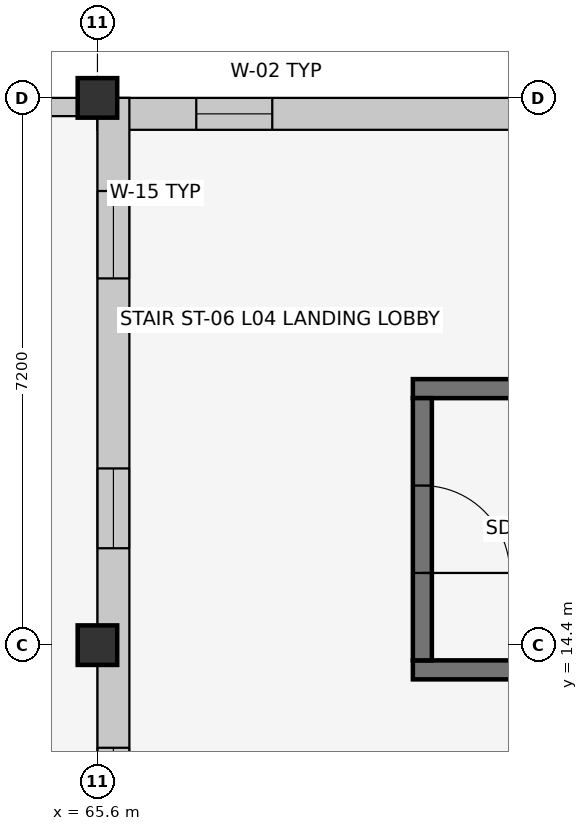
"""IFC4 building model, lengths in metres.
Left out: names, types, materials, properties, quantities, classifications, styles, units other than length and angle.
Written with IfcOpenShell. Run it as: python <this file> out.ifc"""

import sys

from ifc_helpers import new_model, si_unit, direction, frame, frame_2d, origin, origin_2d, place, context, subcontext, project, spatial, rectangle, extrude, element, fill, save


model = new_model("IFC4")
c1 = context("Model", 3, precision=1e-05, world=origin(), true_north=direction((0.0, 1.0)))
c2 = subcontext(c1, "Body", "Model", "MODEL_VIEW")
j1 = project(units=[si_unit("LENGTHUNIT", "METRE"), si_unit("PLANEANGLEUNIT", "RADIAN")], contexts=[c1])
p1 = place(None, origin())
s1 = spatial("IfcSite", under=j1, at=p1, CompositionType="ELEMENT")
p2 = place(p1, origin())
s2 = spatial("IfcBuilding", under=s1, at=p2, CompositionType="ELEMENT")
p3 = place(p2, frame((0.0, 0.0, 18.0)))
s3 = spatial("IfcBuildingStorey", under=s2, at=p3, CompositionType="ELEMENT", Elevation=18.0)
for number, where, z_axis, x_axis in (
    (1, (65.6, 14.4, 0.0), (0.0, 0.0, 1.0), (1.0, 0.0, 0.0)),
    (2, (65.6, 21.6, 0.0), (0.0, 0.0, 1.0), (1.0, 0.0, 0.0)),
):
    element("IfcColumn", number, at=place(p3, frame(where, z_axis=z_axis, x_axis=x_axis)), inside=s3, PredefinedType="COLUMN", context=c2, shape_type="SweptSolid", body=[
        extrude(rectangle(XDim=0.52, YDim=0.52, at=origin_2d()), origin(), (0.0, 0.0, 1.0), 3.9),
    ])
p4 = place(p3, frame((65.6, 21.39, 0.0), z_axis=(0.0, 0.0, 1.0), x_axis=(1.0, 0.0, 0.0)))
e3 = element("IfcWall", 3, at=p4, inside=s3, PredefinedType="SOLIDWALL", context=c2, shape_type="SweptSolid", body=[
    extrude(rectangle(XDim=28.8, YDim=0.42, at=frame_2d((14.4, 0.0))), origin(), (0.0, 0.0, 1.0), 2.955),
])
p5 = place(p4, frame((1.3, 0.0, 0.9)))
e4 = element("IfcOpeningElement", 4, at=p5, cuts=e3, PredefinedType="OPENING", context=c2, shape_type="SweptSolid", body=[
    extrude(rectangle(XDim=1.0, YDim=1.35, at=frame_2d((0.5, 0.675))), frame((0.0, 0.222, 0.0), z_axis=(0.0, -1.0, 0.0), x_axis=(1.0, 0.0, 0.0)), (0.0, 0.0, 1.0), 0.444),
])
p6 = place(p4, frame((8.4, 0.0, 0.9)))
e5 = element("IfcOpeningElement", 5, at=p6, cuts=e3, PredefinedType="OPENING", context=c2, shape_type="SweptSolid", body=[
    extrude(rectangle(XDim=1.2, YDim=1.35, at=frame_2d((0.6, 0.675))), frame((0.0, 0.222, 0.0), z_axis=(0.0, -1.0, 0.0), x_axis=(1.0, 0.0, 0.0)), (0.0, 0.0, 1.0), 0.444),
])
p7 = place(p4, frame((11.95, 0.0, 0.9)))
e6 = element("IfcOpeningElement", 6, at=p7, cuts=e3, PredefinedType="OPENING", context=c2, shape_type="SweptSolid", body=[
    extrude(rectangle(XDim=1.3, YDim=1.35, at=frame_2d((0.65, 0.675))), frame((0.0, 0.222, 0.0), z_axis=(0.0, -1.0, 0.0), x_axis=(1.0, 0.0, 0.0)), (0.0, 0.0, 1.0), 0.444),
])
p8 = place(p4, frame((15.5, 0.0, 0.9)))
e7 = element("IfcOpeningElement", 7, at=p8, cuts=e3, PredefinedType="OPENING", context=c2, shape_type="SweptSolid", body=[
    extrude(rectangle(XDim=1.4, YDim=1.35, at=frame_2d((0.7, 0.675))), frame((0.0, 0.222, 0.0), z_axis=(0.0, -1.0, 0.0), x_axis=(1.0, 0.0, 0.0)), (0.0, 0.0, 1.0), 0.444),
])
p9 = place(p4, frame((22.875, 0.0, 0.9)))
e8 = element("IfcOpeningElement", 8, at=p9, cuts=e3, PredefinedType="OPENING", context=c2, shape_type="SweptSolid", body=[
    extrude(rectangle(XDim=1.05, YDim=1.45, at=frame_2d((0.525, 0.725))), frame((0.0, 0.222, 0.0), z_axis=(0.0, -1.0, 0.0), x_axis=(1.0, 0.0, 0.0)), (0.0, 0.0, 1.0), 0.444),
])
p10 = place(p4, frame((26.425, 0.0, 0.9)))
e9 = element("IfcOpeningElement", 9, at=p10, cuts=e3, PredefinedType="OPENING", context=c2, shape_type="SweptSolid", body=[
    extrude(rectangle(XDim=1.15, YDim=1.45, at=frame_2d((0.575, 0.725))), frame((0.0, 0.222, 0.0), z_axis=(0.0, -1.0, 0.0), x_axis=(1.0, 0.0, 0.0)), (0.0, 0.0, 1.0), 0.444),
])
p11 = place(p3, frame((65.81, 0.0, 0.0), z_axis=(0.0, 0.0, 1.0), x_axis=(0.0, 1.0, 0.0)))
e10 = element("IfcWall", 10, at=p11, inside=s3, PredefinedType="SOLIDWALL", context=c2, shape_type="SweptSolid", body=[
    extrude(rectangle(XDim=21.6, YDim=0.42, at=frame_2d((10.8, 0.0))), origin(), (0.0, 0.0, 1.0), 3.055),
])
p12 = place(p11, frame((1.175, 0.0, 0.9)))
e11 = element("IfcOpeningElement", 11, at=p12, cuts=e10, PredefinedType="OPENING", context=c2, shape_type="SweptSolid", body=[
    extrude(rectangle(XDim=1.25, YDim=1.45, at=frame_2d((0.625, 0.725))), frame((0.0, 0.222, 0.0), z_axis=(0.0, -1.0, 0.0), x_axis=(1.0, 0.0, 0.0)), (0.0, 0.0, 1.0), 0.444),
])
p13 = place(p11, frame((4.725, 0.0, 0.9)))
e12 = element("IfcOpeningElement", 12, at=p13, cuts=e10, PredefinedType="OPENING", context=c2, shape_type="SweptSolid", body=[
    extrude(rectangle(XDim=1.35, YDim=1.45, at=frame_2d((0.675, 0.725))), frame((0.0, 0.222, 0.0), z_axis=(0.0, -1.0, 0.0), x_axis=(1.0, 0.0, 0.0)), (0.0, 0.0, 1.0), 0.444),
])
p14 = place(p11, frame((8.275, 0.0, 0.9)))
e13 = element("IfcOpeningElement", 13, at=p14, cuts=e10, PredefinedType="OPENING", context=c2, shape_type="SweptSolid", body=[
    extrude(rectangle(XDim=1.45, YDim=1.45, at=frame_2d((0.725, 0.725))), frame((0.0, 0.222, 0.0), z_axis=(0.0, -1.0, 0.0), x_axis=(1.0, 0.0, 0.0)), (0.0, 0.0, 1.0), 0.444),
])
p15 = place(p11, frame((12.15, 0.0, 0.9)))
e14 = element("IfcOpeningElement", 14, at=p15, cuts=e10, PredefinedType="OPENING", context=c2, shape_type="SweptSolid", body=[
    extrude(rectangle(XDim=0.9, YDim=1.6, at=frame_2d((0.45, 0.8))), frame((0.0, 0.222, 0.0), z_axis=(0.0, -1.0, 0.0), x_axis=(1.0, 0.0, 0.0)), (0.0, 0.0, 1.0), 0.444),
])
p16 = place(p11, frame((15.675, 0.0, 0.9)))
e15 = element("IfcOpeningElement", 15, at=p16, cuts=e10, PredefinedType="OPENING", context=c2, shape_type="SweptSolid", body=[
    extrude(rectangle(XDim=1.05, YDim=1.6, at=frame_2d((0.525, 0.8))), frame((0.0, 0.222, 0.0), z_axis=(0.0, -1.0, 0.0), x_axis=(1.0, 0.0, 0.0)), (0.0, 0.0, 1.0), 0.444),
])
p17 = place(p11, frame((19.225, 0.0, 0.9)))
e16 = element("IfcOpeningElement", 16, at=p17, cuts=e10, PredefinedType="OPENING", context=c2, shape_type="SweptSolid", body=[
    extrude(rectangle(XDim=1.15, YDim=1.6, at=frame_2d((0.575, 0.8))), frame((0.0, 0.222, 0.0), z_axis=(0.0, -1.0, 0.0), x_axis=(1.0, 0.0, 0.0)), (0.0, 0.0, 1.0), 0.444),
])
p18 = place(p3, frame((58.55, 21.48, 0.0), z_axis=(0.0, 0.0, 1.0), x_axis=(1.0, 0.0, 0.0)))
e17 = element("IfcWall", 17, at=p18, inside=s3, PredefinedType="PARAPET", context=c2, shape_type="SweptSolid", body=[
    extrude(rectangle(XDim=6.9, YDim=0.24, at=frame_2d((3.45, 0.0))), origin(), (0.0, 0.0, 1.0), 0.65),
])
for number, where, z_axis, x_axis in (
    (18, (69.75, 14.075, 0.0), (0.0, 0.0, 1.0), (1.0, 0.0, 0.0)),
    (19, (78.65, 17.775, 0.0), (0.0, 0.0, 1.0), (-1.0, 0.0, 0.0)),
):
    element("IfcWall", number, at=place(p3, frame(where, z_axis=z_axis, x_axis=x_axis)), inside=s3, PredefinedType="SHEAR", context=c2, shape_type="SweptSolid", body=[
        extrude(rectangle(XDim=8.9, YDim=0.25, at=frame_2d((4.45, 0.0))), origin(), (0.0, 0.0, 1.0), 3.66),
    ])
p19 = place(p3, frame((69.875, 17.65, 0.0), z_axis=(0.0, 0.0, 1.0), x_axis=(0.0, -1.0, 0.0)))
e20 = element("IfcWall", 20, at=p19, inside=s3, PredefinedType="SHEAR", context=c2, shape_type="SweptSolid", body=[
    extrude(rectangle(XDim=3.45, YDim=0.25, at=frame_2d((1.725, 0.0))), origin(), (0.0, 0.0, 1.0), 3.66),
])
p20 = place(p19, frame((1.15, 0.0, 0.0)))
e21 = element("IfcOpeningElement", 21, at=p20, cuts=e20, PredefinedType="OPENING", context=c2, shape_type="SweptSolid", body=[
    extrude(rectangle(XDim=1.15, YDim=2.15, at=frame_2d((0.575, 1.075))), frame((0.0, 0.137, 0.0), z_axis=(0.0, -1.0, 0.0), x_axis=(1.0, 0.0, 0.0)), (0.0, 0.0, 1.0), 0.274),
])
p21 = place(p5, origin())
e22 = element("IfcWindow", 22, at=p21, inside=s3, PartitioningType="SINGLE_PANEL", PredefinedType="WINDOW", context=c2, shape_type="SweptSolid", body=[
    extrude(rectangle(XDim=1.0, YDim=1.35, at=frame_2d((0.5, 0.675))), frame((0.0, 0.03, 0.0), z_axis=(0.0, -1.0, 0.0), x_axis=(1.0, 0.0, 0.0)), (0.0, 0.0, 1.0), 0.06),
])
fill(e4, e22)
p22 = place(p15, origin())
e23 = element("IfcWindow", 23, at=p22, inside=s3, PartitioningType="SINGLE_PANEL", PredefinedType="WINDOW", context=c2, shape_type="SweptSolid", body=[
    extrude(rectangle(XDim=0.9, YDim=1.6, at=frame_2d((0.45, 0.8))), frame((0.0, 0.03, 0.0), z_axis=(0.0, -1.0, 0.0), x_axis=(1.0, 0.0, 0.0)), (0.0, 0.0, 1.0), 0.06),
])
fill(e14, e23)
p23 = place(p16, origin())
e24 = element("IfcWindow", 24, at=p23, inside=s3, PartitioningType="SINGLE_PANEL", PredefinedType="WINDOW", context=c2, shape_type="SweptSolid", body=[
    extrude(rectangle(XDim=1.05, YDim=1.6, at=frame_2d((0.525, 0.8))), frame((0.0, 0.03, 0.0), z_axis=(0.0, -1.0, 0.0), x_axis=(1.0, 0.0, 0.0)), (0.0, 0.0, 1.0), 0.06),
])
fill(e15, e24)
p24 = place(p17, origin())
e25 = element("IfcWindow", 25, at=p24, inside=s3, PartitioningType="SINGLE_PANEL", PredefinedType="WINDOW", context=c2, shape_type="SweptSolid", body=[
    extrude(rectangle(XDim=1.15, YDim=1.6, at=frame_2d((0.575, 0.8))), frame((0.0, 0.03, 0.0), z_axis=(0.0, -1.0, 0.0), x_axis=(1.0, 0.0, 0.0)), (0.0, 0.0, 1.0), 0.06),
])
fill(e16, e25)
p25 = place(p20, origin())
e26 = element("IfcDoor", 26, at=p25, inside=s3, OperationType="SINGLE_SWING_RIGHT", PredefinedType="DOOR", context=c2, shape_type="SweptSolid", body=[
    extrude(rectangle(XDim=1.15, YDim=2.15, at=frame_2d((0.575, 1.075))), frame((0.0, 0.025, 0.0), z_axis=(0.0, -1.0, 0.0), x_axis=(1.0, 0.0, 0.0)), (0.0, 0.0, 1.0), 0.05),
])
fill(e21, e26)
save(model, sys.argv[1])
